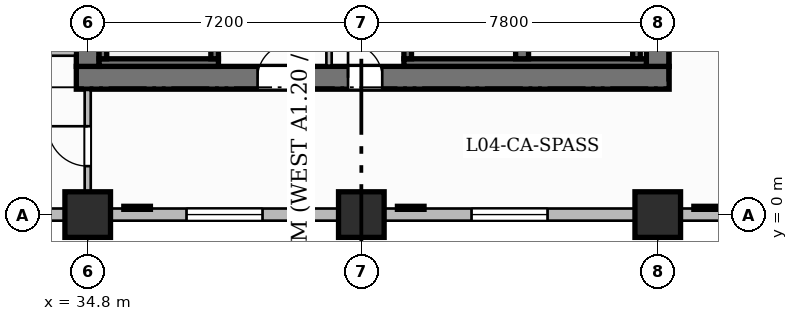
"""IFC4 building model, lengths in metres.
Left out: names, types, materials, properties, quantities, classifications, styles, units other than length and angle.
Written with IfcOpenShell. Run it as: python <this file> out.ifc"""

import sys

from ifc_helpers import new_model, si_unit, direction, frame, frame_2d, origin, origin_2d, place, context, subcontext, project, spatial, rectangle, extrude, source, transform, mapped, element, fill, save


model = new_model("IFC4")
c1 = context("Model", 3, precision=1e-05, world=origin(), true_north=direction((0.0, 1.0)))
c2 = subcontext(c1, "Body", "Model", "MODEL_VIEW")
j1 = project(units=[si_unit("LENGTHUNIT", "METRE"), si_unit("PLANEANGLEUNIT", "RADIAN")], contexts=[c1])
p1 = place(None, origin())
s1 = spatial("IfcSite", under=j1, at=p1, CompositionType="ELEMENT")
p2 = place(p1, origin())
s2 = spatial("IfcBuilding", under=s1, at=p2, CompositionType="ELEMENT")
p3 = place(p2, frame((0.0, 0.0, 21.6)))
s3 = spatial("IfcBuildingStorey", under=s2, at=p3, CompositionType="ELEMENT", Elevation=21.6)
p4 = place(p3, frame((34.5, 3.6, 0.0), z_axis=(0.0, 0.0, 1.0), x_axis=(1.0, 0.0, 0.0)))
e1 = element("IfcWall", 1, at=p4, inside=s3, PredefinedType="SHEAR", context=c2, shape_type="SweptSolid", body=[
    extrude(rectangle(XDim=15.6, YDim=0.6, at=frame_2d((7.8, 0.0))), origin(), (0.0, 0.0, 1.0), 5.4),
])
p5 = place(p4, frame((4.77, 0.0, 0.0)))
e2 = element("IfcOpeningElement", 2, at=p5, cuts=e1, PredefinedType="OPENING", context=c2, shape_type="SweptSolid", body=[
    extrude(rectangle(XDim=0.9, YDim=2.1, at=frame_2d((0.45, 1.05))), frame((0.0, 0.31, 0.0), z_axis=(0.0, -1.0, 0.0), x_axis=(1.0, 0.0, 0.0)), (0.0, 0.0, 1.0), 0.62),
])
p6 = place(p4, frame((7.15, 0.0, 0.0)))
e3 = element("IfcOpeningElement", 3, at=p6, cuts=e1, PredefinedType="OPENING", context=c2, shape_type="SweptSolid", body=[
    extrude(rectangle(XDim=0.9, YDim=2.1, at=frame_2d((0.45, 1.05))), frame((0.0, 0.31, 0.0), z_axis=(0.0, -1.0, 0.0), x_axis=(1.0, 0.0, 0.0)), (0.0, 0.0, 1.0), 0.62),
])
for number, where, z_axis, x_axis in (
    (4, (34.8, 3.9, 0.0), (0.0, 0.0, 1.0), (0.0, 1.0, 0.0)),
    (5, (49.8, 3.9, 0.0), (0.0, 0.0, 1.0), (0.0, 1.0, 0.0)),
):
    element("IfcWall", number, at=place(p3, frame(where, z_axis=z_axis, x_axis=x_axis)), inside=s3, PredefinedType="SHEAR", context=c2, shape_type="SweptSolid", body=[
        extrude(rectangle(XDim=10.2, YDim=0.6, at=frame_2d((5.1, 0.0))), origin(), (0.0, 0.0, 1.0), 5.4),
    ])
m1 = source(origin(), c2, "Body", "SweptSolid", [
    extrude(rectangle(XDim=1.2, YDim=1.2, at=origin_2d()), origin(), (0.0, 0.0, 1.0), 5.4),
])
for number, where, z_axis, x_axis in (
    (6, (34.8, 0.0, 0.0), (0.0, 0.0, 1.0), (1.0, 0.0, 0.0)),
    (7, (42.0, 0.0, 0.0), (0.0, 0.0, 1.0), (1.0, 0.0, 0.0)),
    (8, (49.8, 0.0, 0.0), (0.0, 0.0, 1.0), (1.0, 0.0, 0.0)),
):
    element("IfcColumn", number, at=place(p3, frame(where, z_axis=z_axis, x_axis=x_axis)), inside=s3, PredefinedType="COLUMN", context=c2, shape_type="MappedRepresentation", body=[
        mapped(m1, transform((0.0, 0.0, 0.0), scale=1.0)),
    ])
p7 = place(p3, frame((35.1, 4.0, 0.0), z_axis=(0.0, 0.0, 1.0), x_axis=(1.0, 0.0, 0.0)))
e9 = element("IfcWall", 9, at=p7, inside=s3, PredefinedType="SHEAR", context=c2, shape_type="SweptSolid", body=[
    extrude(rectangle(XDim=3.14, YDim=0.2, at=frame_2d((1.57, 0.0))), origin(), (0.0, 0.0, 1.0), 5.4),
])
for number, where, z_axis, x_axis in (
    (10, (35.2, 4.1, 0.0), (0.0, 0.0, 1.0), (0.0, 1.0, 0.0)),
    (11, (38.14, 4.1, 0.0), (0.0, 0.0, 1.0), (0.0, 1.0, 0.0)),
):
    element("IfcWall", number, at=place(p3, frame(where, z_axis=z_axis, x_axis=x_axis)), inside=s3, PredefinedType="SHEAR", context=c2, shape_type="SweptSolid", body=[
        extrude(rectangle(XDim=6.95, YDim=0.2, at=frame_2d((3.475, 0.0))), origin(), (0.0, 0.0, 1.0), 5.4),
    ])
p8 = place(p3, frame((43.12, 4.0, 0.0), z_axis=(0.0, 0.0, 1.0), x_axis=(1.0, 0.0, 0.0)))
e12 = element("IfcWall", 12, at=p8, inside=s3, PredefinedType="SHEAR", context=c2, shape_type="SweptSolid", body=[
    extrude(rectangle(XDim=6.38, YDim=0.2, at=frame_2d((3.19, 0.0))), origin(), (0.0, 0.0, 1.0), 5.4),
])
p9 = place(p3, frame((43.22, 4.1, 0.0), z_axis=(0.0, 0.0, 1.0), x_axis=(0.0, 1.0, 0.0)))
e13 = element("IfcWall", 13, at=p9, inside=s3, PredefinedType="SHEAR", context=c2, shape_type="SweptSolid", body=[
    extrude(rectangle(XDim=6.95, YDim=0.2, at=frame_2d((3.475, 0.0))), origin(), (0.0, 0.0, 1.0), 5.4),
])
p10 = place(p3, frame((46.23, 4.1, 0.0), z_axis=(0.0, 0.0, 1.0), x_axis=(0.0, 1.0, 0.0)))
e14 = element("IfcWall", 14, at=p10, inside=s3, PredefinedType="SHEAR", context=c2, shape_type="SweptSolid", body=[
    extrude(rectangle(XDim=6.95, YDim=0.34, at=frame_2d((3.475, 0.0))), origin(), (0.0, 0.0, 1.0), 5.4),
])
p11 = place(p3, frame((49.24, 4.1, 0.0), z_axis=(0.0, 0.0, 1.0), x_axis=(0.0, 1.0, 0.0)))
e15 = element("IfcWall", 15, at=p11, inside=s3, PredefinedType="SHEAR", context=c2, shape_type="SweptSolid", body=[
    extrude(rectangle(XDim=6.95, YDim=0.2, at=frame_2d((3.475, 0.0))), origin(), (0.0, 0.0, 1.0), 5.4),
])
p12 = place(p3, frame((41.15, 3.92, 0.0), z_axis=(0.0, 0.0, 1.0), x_axis=(0.0, 1.0, 0.0)))
e16 = element("IfcWall", 16, at=p12, inside=s3, PredefinedType="PARTITIONING", context=c2, shape_type="SweptSolid", body=[
    extrude(rectangle(XDim=3.99, YDim=0.14, at=frame_2d((1.995, 0.0))), origin(), (0.0, 0.0, 1.0), 5.1),
])
p13 = place(p3, frame((32.16, 4.28, 0.0), z_axis=(0.0, 0.0, 1.0), x_axis=(1.0, 0.0, 0.0)))
e17 = element("IfcWall", 17, at=p13, inside=s3, PredefinedType="PARTITIONING", context=c2, shape_type="SweptSolid", body=[
    extrude(rectangle(XDim=2.31, YDim=0.2, at=frame_2d((1.155, 0.0))), origin(), (0.0, 0.0, 1.0), 5.1),
])
p14 = place(p3, frame((34.8, 0.32, 0.0), z_axis=(0.0, 0.0, 1.0), x_axis=(0.0, 1.0, 0.0)))
e18 = element("IfcWall", 18, at=p14, inside=s3, PredefinedType="PARTITIONING", context=c2, shape_type="SweptSolid", body=[
    extrude(rectangle(XDim=2.96, YDim=0.16, at=frame_2d((1.48, 0.0))), origin(), (0.0, 0.0, 1.0), 5.1),
])
p15 = place(p14, frame((0.955, 0.0, 0.0)))
e19 = element("IfcOpeningElement", 19, at=p15, cuts=e18, PredefinedType="OPENING", context=c2, shape_type="SweptSolid", body=[
    extrude(rectangle(XDim=1.05, YDim=2.15, at=frame_2d((0.525, 1.075))), frame((0.0, 0.09, 0.0), z_axis=(0.0, -1.0, 0.0), x_axis=(1.0, 0.0, 0.0)), (0.0, 0.0, 1.0), 0.18),
])
p16 = place(p3, frame((-4.8, 0.0, 0.0), z_axis=(0.0, 0.0, 1.0), x_axis=(1.0, 0.0, 0.0)))
e20 = element("IfcWall", 20, at=p16, inside=s3, PredefinedType="SOLIDWALL", context=c2, shape_type="SweptSolid", body=[
    extrude(rectangle(XDim=85.2, YDim=0.32, at=frame_2d((42.6, 0.0))), origin(), (0.0, 0.0, 1.0), 4.085),
])
p17 = place(p16, frame((1.4, 0.0, 0.75)))
e21 = element("IfcOpeningElement", 21, at=p17, cuts=e20, PredefinedType="OPENING", context=c2, shape_type="SweptSolid", body=[
    extrude(rectangle(XDim=2.0, YDim=2.6, at=frame_2d((1.0, 1.3))), frame((0.0, 0.17, 0.0), z_axis=(0.0, -1.0, 0.0), x_axis=(1.0, 0.0, 0.0)), (0.0, 0.0, 1.0), 0.34),
])
p18 = place(p16, frame((7.4, 0.0, 0.75)))
e22 = element("IfcOpeningElement", 22, at=p18, cuts=e20, PredefinedType="OPENING", context=c2, shape_type="SweptSolid", body=[
    extrude(rectangle(XDim=2.0, YDim=2.6, at=frame_2d((1.0, 1.3))), frame((0.0, 0.17, 0.0), z_axis=(0.0, -1.0, 0.0), x_axis=(1.0, 0.0, 0.0)), (0.0, 0.0, 1.0), 0.34),
])
p19 = place(p16, frame((14.6, 0.0, 0.75)))
e23 = element("IfcOpeningElement", 23, at=p19, cuts=e20, PredefinedType="OPENING", context=c2, shape_type="SweptSolid", body=[
    extrude(rectangle(XDim=2.0, YDim=2.6, at=frame_2d((1.0, 1.3))), frame((0.0, 0.17, 0.0), z_axis=(0.0, -1.0, 0.0), x_axis=(1.0, 0.0, 0.0)), (0.0, 0.0, 1.0), 0.34),
])
p20 = place(p16, frame((21.8, 0.0, 0.75)))
e24 = element("IfcOpeningElement", 24, at=p20, cuts=e20, PredefinedType="OPENING", context=c2, shape_type="SweptSolid", body=[
    extrude(rectangle(XDim=2.0, YDim=2.6, at=frame_2d((1.0, 1.3))), frame((0.0, 0.17, 0.0), z_axis=(0.0, -1.0, 0.0), x_axis=(1.0, 0.0, 0.0)), (0.0, 0.0, 1.0), 0.34),
])
p21 = place(p16, frame((29.0, 0.0, 0.75)))
e25 = element("IfcOpeningElement", 25, at=p21, cuts=e20, PredefinedType="OPENING", context=c2, shape_type="SweptSolid", body=[
    extrude(rectangle(XDim=2.0, YDim=2.6, at=frame_2d((1.0, 1.3))), frame((0.0, 0.17, 0.0), z_axis=(0.0, -1.0, 0.0), x_axis=(1.0, 0.0, 0.0)), (0.0, 0.0, 1.0), 0.34),
])
p22 = place(p16, frame((35.6, 0.0, 0.75)))
e26 = element("IfcOpeningElement", 26, at=p22, cuts=e20, PredefinedType="OPENING", context=c2, shape_type="SweptSolid", body=[
    extrude(rectangle(XDim=2.0, YDim=2.6, at=frame_2d((1.0, 1.3))), frame((0.0, 0.17, 0.0), z_axis=(0.0, -1.0, 0.0), x_axis=(1.0, 0.0, 0.0)), (0.0, 0.0, 1.0), 0.34),
])
p23 = place(p16, frame((42.2, 0.0, 0.75)))
e27 = element("IfcOpeningElement", 27, at=p23, cuts=e20, PredefinedType="OPENING", context=c2, shape_type="SweptSolid", body=[
    extrude(rectangle(XDim=2.0, YDim=2.6, at=frame_2d((1.0, 1.3))), frame((0.0, 0.17, 0.0), z_axis=(0.0, -1.0, 0.0), x_axis=(1.0, 0.0, 0.0)), (0.0, 0.0, 1.0), 0.34),
])
p24 = place(p16, frame((49.7, 0.0, 0.75)))
e28 = element("IfcOpeningElement", 28, at=p24, cuts=e20, PredefinedType="OPENING", context=c2, shape_type="SweptSolid", body=[
    extrude(rectangle(XDim=2.0, YDim=2.6, at=frame_2d((1.0, 1.3))), frame((0.0, 0.17, 0.0), z_axis=(0.0, -1.0, 0.0), x_axis=(1.0, 0.0, 0.0)), (0.0, 0.0, 1.0), 0.34),
])
p25 = place(p16, frame((57.5, 0.0, 0.75)))
e29 = element("IfcOpeningElement", 29, at=p25, cuts=e20, PredefinedType="OPENING", context=c2, shape_type="SweptSolid", body=[
    extrude(rectangle(XDim=2.0, YDim=2.6, at=frame_2d((1.0, 1.3))), frame((0.0, 0.17, 0.0), z_axis=(0.0, -1.0, 0.0), x_axis=(1.0, 0.0, 0.0)), (0.0, 0.0, 1.0), 0.34),
])
p26 = place(p16, frame((66.8, 0.0, 0.75)))
e30 = element("IfcOpeningElement", 30, at=p26, cuts=e20, PredefinedType="OPENING", context=c2, shape_type="SweptSolid", body=[
    extrude(rectangle(XDim=2.0, YDim=2.6, at=frame_2d((1.0, 1.3))), frame((0.0, 0.17, 0.0), z_axis=(0.0, -1.0, 0.0), x_axis=(1.0, 0.0, 0.0)), (0.0, 0.0, 1.0), 0.34),
])
p27 = place(p16, frame((77.6, 0.0, 0.75)))
e31 = element("IfcOpeningElement", 31, at=p27, cuts=e20, PredefinedType="OPENING", context=c2, shape_type="SweptSolid", body=[
    extrude(rectangle(XDim=2.0, YDim=2.6, at=frame_2d((1.0, 1.3))), frame((0.0, 0.17, 0.0), z_axis=(0.0, -1.0, 0.0), x_axis=(1.0, 0.0, 0.0)), (0.0, 0.0, 1.0), 0.34),
])
m2 = source(origin(), c2, "Body", "SweptSolid", [
    extrude(rectangle(XDim=0.9, YDim=2.1, at=frame_2d((0.45, 1.05))), frame((0.0, 0.025, 0.0), z_axis=(0.0, -1.0, 0.0), x_axis=(1.0, 0.0, 0.0)), (0.0, 0.0, 1.0), 0.05),
])
p28 = place(p5, origin())
e32 = element("IfcDoor", 32, at=p28, inside=s3, OperationType="SINGLE_SWING_RIGHT", PredefinedType="DOOR", context=c2, shape_type="MappedRepresentation", body=[
    mapped(m2, transform((0.0, 0.0, 0.0), scale=1.0)),
])
fill(e2, e32)
p29 = place(p6, origin())
e33 = element("IfcDoor", 33, at=p29, inside=s3, OperationType="SINGLE_SWING_LEFT", PredefinedType="DOOR", context=c2, shape_type="MappedRepresentation", body=[
    mapped(m2, transform((0.0, 0.0, 0.0), scale=1.0)),
])
fill(e3, e33)
m3 = source(origin(), c2, "Body", "SweptSolid", [
    extrude(rectangle(XDim=1.05, YDim=2.15, at=frame_2d((0.525, 1.075))), frame((0.0, 0.025, 0.0), z_axis=(0.0, -1.0, 0.0), x_axis=(1.0, 0.0, 0.0)), (0.0, 0.0, 1.0), 0.05),
])
p30 = place(p15, origin())
e34 = element("IfcDoor", 34, at=p30, inside=s3, OperationType="SINGLE_SWING_RIGHT", PredefinedType="DOOR", context=c2, shape_type="MappedRepresentation", body=[
    mapped(m3, transform((0.0, 0.0, 0.0), scale=1.0)),
])
fill(e19, e34)
m4 = source(origin(), c2, "Body", "SweptSolid", [
    extrude(rectangle(XDim=2.0, YDim=2.6, at=frame_2d((1.0, 1.3))), frame((0.0, 0.03, 0.0), z_axis=(0.0, -1.0, 0.0), x_axis=(1.0, 0.0, 0.0)), (0.0, 0.0, 1.0), 0.06),
])
p31 = place(p23, origin())
e35 = element("IfcWindow", 35, at=p31, inside=s3, PartitioningType="DOUBLE_PANEL_VERTICAL", PredefinedType="WINDOW", context=c2, shape_type="MappedRepresentation", body=[
    mapped(m4, transform((0.0, 0.0, 0.0), scale=1.0)),
])
fill(e27, e35)
p32 = place(p24, origin())
e36 = element("IfcWindow", 36, at=p32, inside=s3, PartitioningType="DOUBLE_PANEL_VERTICAL", PredefinedType="WINDOW", context=c2, shape_type="MappedRepresentation", body=[
    mapped(m4, transform((0.0, 0.0, 0.0), scale=1.0)),
])
fill(e28, e36)
save(model, sys.argv[1])
